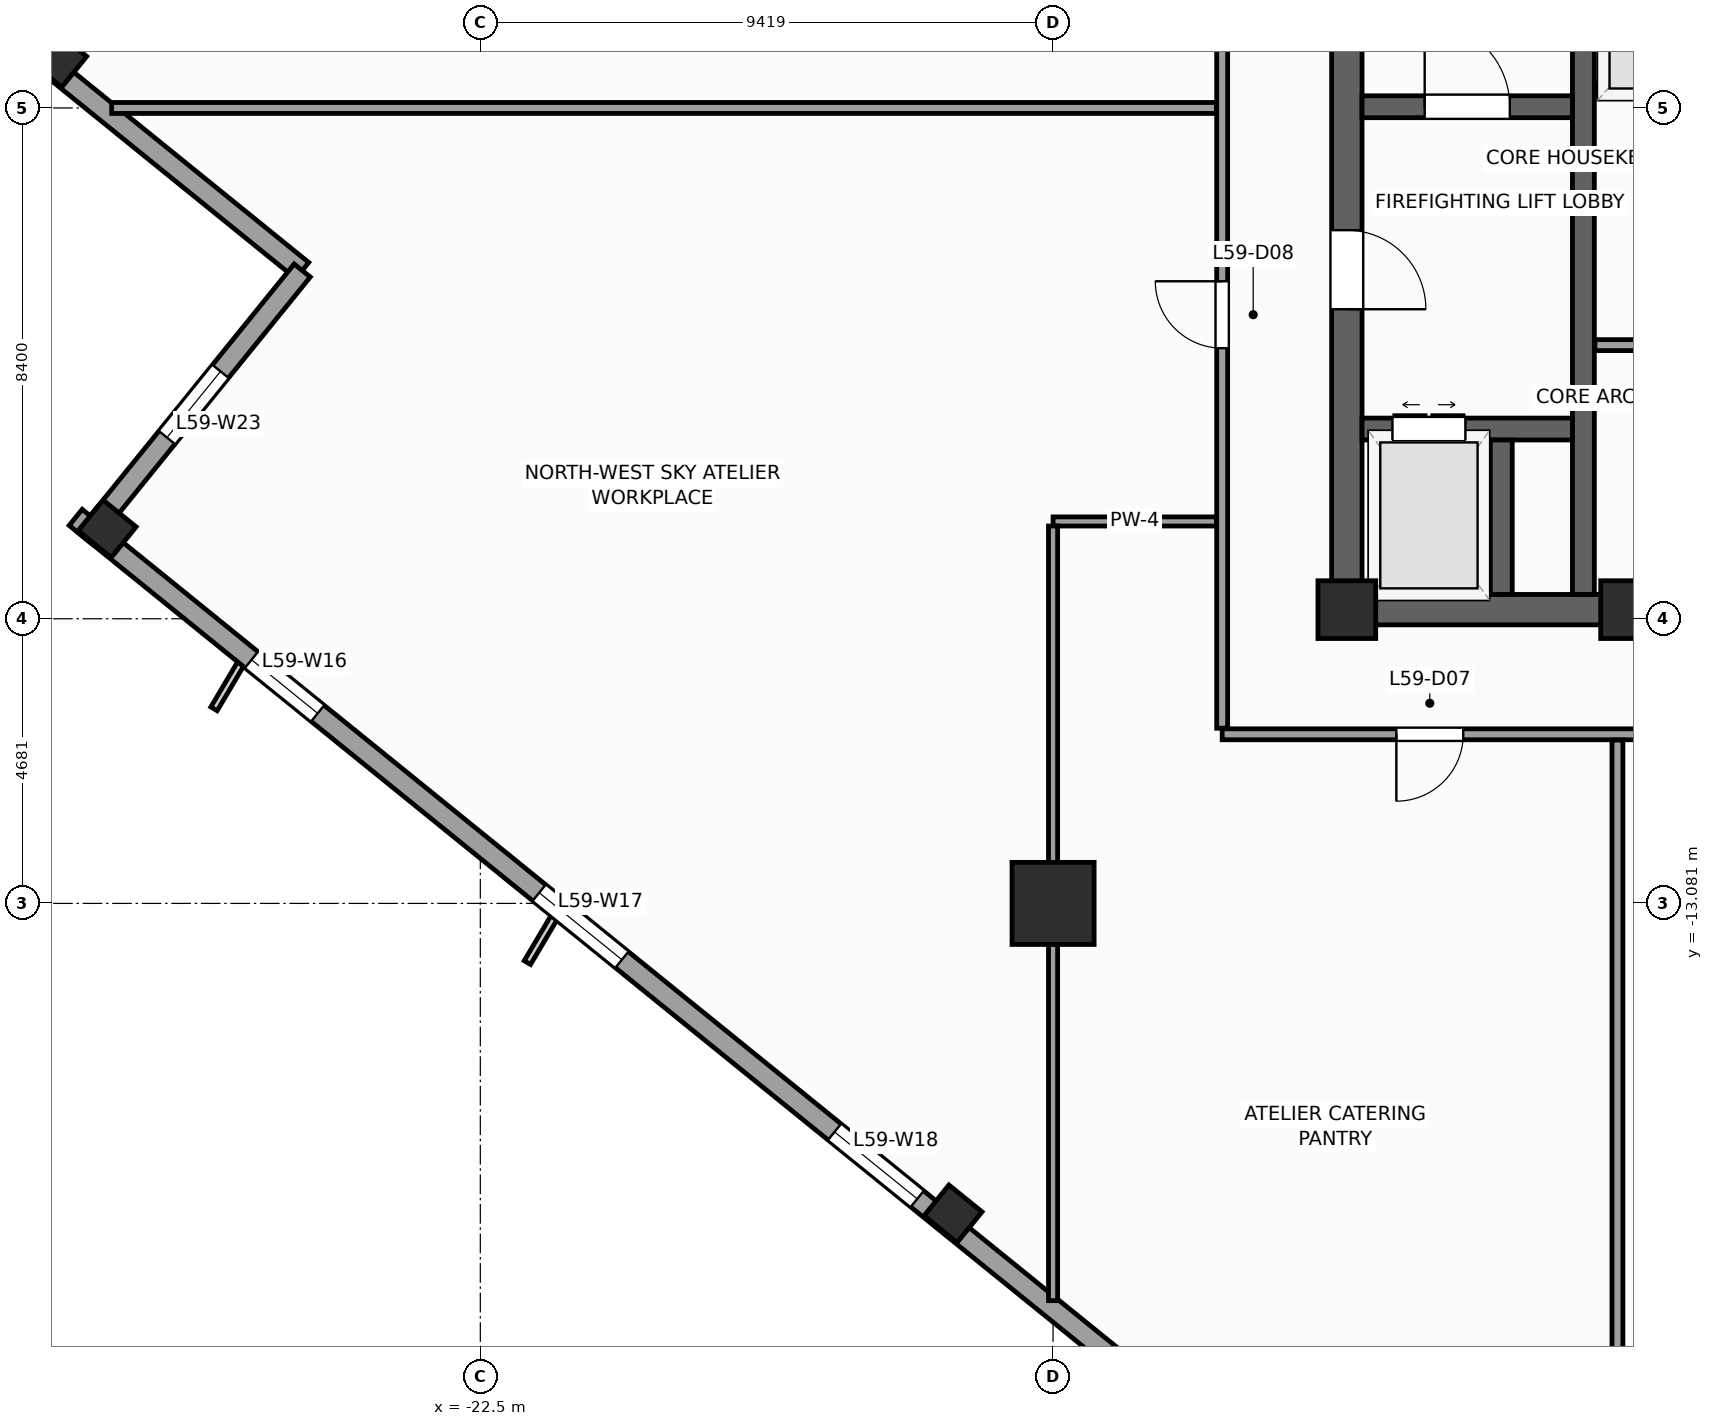
"""IFC4 building model, lengths in metres.
Left out: names, types, materials, properties, quantities, classifications, styles, units other than length and angle.
Written with IfcOpenShell. Run it as: python <this file> out.ifc"""

import sys

from ifc_helpers import new_model, si_unit, direction, frame, frame_2d, origin, origin_2d, place, context, subcontext, project, spatial, rectangle, extrude, source, transform, mapped, element, fill, save


model = new_model("IFC4")
c1 = context("Model", 3, precision=1e-05, world=origin(), true_north=direction((0.0, 1.0)))
c2 = subcontext(c1, "Body", "Model", "MODEL_VIEW")
j1 = project(units=[si_unit("LENGTHUNIT", "METRE"), si_unit("PLANEANGLEUNIT", "RADIAN")], contexts=[c1])
p1 = place(None, origin())
s1 = spatial("IfcSite", under=j1, at=p1, CompositionType="ELEMENT")
p2 = place(p1, origin())
s2 = spatial("IfcBuilding", under=s1, at=p2, CompositionType="ELEMENT")
p3 = place(p2, frame((0.0, 0.0, 244.6)))
s3 = spatial("IfcBuildingStorey", under=s2, at=p3, CompositionType="ELEMENT", Elevation=244.6)
p4 = place(p3, frame((-8.5, -8.25, 0.0), z_axis=(0.0, 0.0, 1.0), x_axis=(1.0, 0.0, 0.0)))
e1 = element("IfcWall", 1, at=p4, inside=s3, PredefinedType="SHEAR", context=c2, shape_type="SweptSolid", body=[
    extrude(rectangle(XDim=17.0, YDim=0.5, at=frame_2d((8.5, 0.0))), origin(), (0.0, 0.0, 1.0), 3.9),
])
p5 = place(p4, frame((7.85, 0.0, 0.0)))
e2 = element("IfcOpeningElement", 2, at=p5, cuts=e1, PredefinedType="OPENING", context=c2, shape_type="SweptSolid", body=[
    extrude(rectangle(XDim=1.3, YDim=2.2, at=frame_2d((0.65, 1.1))), frame((0.0, 0.26, 0.0), z_axis=(0.0, -1.0, 0.0), x_axis=(1.0, 0.0, 0.0)), (0.0, 0.0, 1.0), 0.52),
])
p6 = place(p3, frame((-8.25, -8.0, 0.0), z_axis=(0.0, 0.0, 1.0), x_axis=(0.0, 1.0, 0.0)))
e3 = element("IfcWall", 3, at=p6, inside=s3, PredefinedType="SHEAR", context=c2, shape_type="SweptSolid", body=[
    extrude(rectangle(XDim=16.0, YDim=0.5, at=frame_2d((8.0, 0.0))), origin(), (0.0, 0.0, 1.0), 3.9),
])
p7 = place(p6, frame((4.69, 0.0, 0.0)))
e4 = element("IfcOpeningElement", 4, at=p7, cuts=e3, PredefinedType="OPENING", context=c2, shape_type="SweptSolid", body=[
    extrude(rectangle(XDim=1.3, YDim=2.2, at=frame_2d((0.65, 1.1))), frame((0.0, 0.26, 0.0), z_axis=(0.0, -1.0, 0.0), x_axis=(1.0, 0.0, 0.0)), (0.0, 0.0, 1.0), 0.52),
])
p8 = place(p3, frame((-4.36, -8.0, 0.0), z_axis=(0.0, 0.0, 1.0), x_axis=(0.0, 1.0, 0.0)))
e5 = element("IfcWall", 5, at=p8, inside=s3, PredefinedType="SHEAR", context=c2, shape_type="SweptSolid", body=[
    extrude(rectangle(XDim=16.0, YDim=0.36, at=frame_2d((8.0, 0.0))), origin(), (0.0, 0.0, 1.0), 3.9),
])
p9 = place(p3, frame((-8.0, 0.02, 0.0), z_axis=(0.0, 0.0, 1.0), x_axis=(1.0, 0.0, 0.0)))
e6 = element("IfcWall", 6, at=p9, inside=s3, PredefinedType="SHEAR", context=c2, shape_type="SweptSolid", body=[
    extrude(rectangle(XDim=3.46, YDim=0.36, at=frame_2d((1.73, 0.0))), origin(), (0.0, 0.0, 1.0), 3.9),
])
p10 = place(p9, frame((1.03, 0.0, 0.0)))
e7 = element("IfcOpeningElement", 7, at=p10, cuts=e6, PredefinedType="OPENING", context=c2, shape_type="SweptSolid", body=[
    extrude(rectangle(XDim=1.4, YDim=2.2, at=frame_2d((0.7, 1.1))), frame((0.0, 0.19, 0.0), z_axis=(0.0, -1.0, 0.0), x_axis=(1.0, 0.0, 0.0)), (0.0, 0.0, 1.0), 0.38),
])
p11 = place(p3, frame((-8.0, -5.28, 0.0), z_axis=(0.0, 0.0, 1.0), x_axis=(1.0, 0.0, 0.0)))
e8 = element("IfcWall", 8, at=p11, inside=s3, PredefinedType="SHEAR", context=c2, shape_type="SweptSolid", body=[
    extrude(rectangle(XDim=3.46, YDim=0.36, at=frame_2d((1.73, 0.0))), origin(), (0.0, 0.0, 1.0), 3.9),
])
p12 = place(p11, frame((0.5, 0.0, 0.0)))
e9 = element("IfcOpeningElement", 9, at=p12, cuts=e8, PredefinedType="OPENING", context=c2, shape_type="SweptSolid", body=[
    extrude(rectangle(XDim=1.2, YDim=2.25, at=frame_2d((0.6, 1.125))), frame((0.0, 0.19, 0.0), z_axis=(0.0, -1.0, 0.0), x_axis=(1.0, 0.0, 0.0)), (0.0, 0.0, 1.0), 0.38),
])
p13 = place(p3, frame((-5.71, -8.0, 0.0), z_axis=(0.0, 0.0, 1.0), x_axis=(0.0, 1.0, 0.0)))
e10 = element("IfcWall", 10, at=p13, inside=s3, PredefinedType="SHEAR", context=c2, shape_type="SweptSolid", body=[
    extrude(rectangle(XDim=2.54, YDim=0.36, at=frame_2d((1.27, 0.0))), origin(), (0.0, 0.0, 1.0), 3.9),
])
m1 = source(origin(), c2, "Body", "SweptSolid", [
    extrude(rectangle(XDim=0.95, YDim=0.95, at=origin_2d()), origin(), (0.0, 0.0, 1.0), 3.9),
])
for number, where, z_axis, x_axis in (
    (11, (-8.25, -8.25, 0.0), (0.0, 0.0, 1.0), (1.0, 0.0, 0.0)),
    (12, (-3.6, -8.25, 0.0), (0.0, 0.0, 1.0), (1.0, 0.0, 0.0)),
):
    element("IfcColumn", number, at=place(p3, frame(where, z_axis=z_axis, x_axis=x_axis)), inside=s3, PredefinedType="PILASTER", context=c2, shape_type="MappedRepresentation", body=[
        mapped(m1, transform((0.0, 0.0, 0.0), scale=1.0)),
    ])
m2 = source(origin(), c2, "Body", "SweptSolid", [
    extrude(rectangle(XDim=1.35, YDim=1.35, at=origin_2d()), origin(), (0.0, 0.0, 1.0), 3.9),
])
p14 = place(p3, frame((-13.081, -13.081, 0.0), z_axis=(0.0, 0.0, 1.0), x_axis=(1.0, 0.0, 0.0)))
e13 = element("IfcColumn", 13, at=p14, inside=s3, PredefinedType="COLUMN", context=c2, shape_type="MappedRepresentation", body=[
    mapped(m2, transform((0.0, 0.0, 0.0), scale=1.0)),
])
m3 = source(origin(), c2, "Body", "SweptSolid", [
    extrude(rectangle(XDim=0.65, YDim=0.7, at=origin_2d()), origin(), (0.0, 0.0, 1.0), 3.9),
])
for number, where, z_axis, x_axis in (
    (14, (-29.45, 0.815, 0.0), (0.0, 0.0, 1.0), (0.629, 0.777, 0.0)),
    (15, (-28.637, -6.92, 0.0), (0.0, 0.0, 1.0), (0.629, 0.777, 0.0)),
    (16, (-14.726, -18.185, 0.0), (0.0, 0.0, 1.0), (0.629, 0.777, 0.0)),
):
    element("IfcColumn", number, at=place(p3, frame(where, z_axis=z_axis, x_axis=x_axis)), inside=s3, PredefinedType="COLUMN", context=c2, shape_type="MappedRepresentation", body=[
        mapped(m3, transform((0.0, 0.0, 0.0), scale=1.0)),
    ])
p15 = place(p3, frame((-6.733, 29.154, 0.0), z_axis=(0.0, 0.0, 1.0), x_axis=(-0.629325378072, -0.77714192302, 0.0)))
e17 = element("IfcWall", 17, at=p15, inside=s3, PredefinedType="STANDARD", context=c2, shape_type="SweptSolid", body=[
    extrude(rectangle(XDim=36.84, YDim=0.34, at=frame_2d((18.42, 0.0))), origin(), (0.0, 0.0, 1.0), 2.96),
])
p16 = place(p15, frame((23.495, 0.0, 0.0)))
e18 = element("IfcOpeningElement", 18, at=p16, cuts=e17, PredefinedType="OPENING", context=c2, shape_type="SweptSolid", body=[
    extrude(rectangle(XDim=1.05, YDim=2.25, at=frame_2d((0.525, 1.125))), frame((0.0, 0.18, 0.0), z_axis=(0.0, -1.0, 0.0), x_axis=(1.0, 0.0, 0.0)), (0.0, 0.0, 1.0), 0.36),
])
p17 = place(p15, frame((3.721, 0.0, 0.48)))
e19 = element("IfcOpeningElement", 19, at=p17, cuts=e17, PredefinedType="OPENING", context=c2, shape_type="SweptSolid", body=[
    extrude(rectangle(XDim=1.4, YDim=2.4, at=frame_2d((0.7, 1.2))), frame((0.0, 0.18, 0.0), z_axis=(0.0, -1.0, 0.0), x_axis=(1.0, 0.0, 0.0)), (0.0, 0.0, 1.0), 0.36),
])
p18 = place(p15, frame((9.809, 0.0, 0.58)))
e20 = element("IfcOpeningElement", 20, at=p18, cuts=e17, PredefinedType="OPENING", context=c2, shape_type="SweptSolid", body=[
    extrude(rectangle(XDim=1.75, YDim=2.3, at=frame_2d((0.875, 1.15))), frame((0.0, 0.18, 0.0), z_axis=(0.0, -1.0, 0.0), x_axis=(1.0, 0.0, 0.0)), (0.0, 0.0, 1.0), 0.36),
])
p19 = place(p15, frame((16.058, 0.0, 0.58)))
e21 = element("IfcOpeningElement", 21, at=p19, cuts=e17, PredefinedType="OPENING", context=c2, shape_type="SweptSolid", body=[
    extrude(rectangle(XDim=1.75, YDim=2.3, at=frame_2d((0.875, 1.15))), frame((0.0, 0.18, 0.0), z_axis=(0.0, -1.0, 0.0), x_axis=(1.0, 0.0, 0.0)), (0.0, 0.0, 1.0), 0.36),
])
p20 = place(p15, frame((25.676, 0.0, 0.58)))
e22 = element("IfcOpeningElement", 22, at=p20, cuts=e17, PredefinedType="OPENING", context=c2, shape_type="SweptSolid", body=[
    extrude(rectangle(XDim=1.75, YDim=2.3, at=frame_2d((0.875, 1.15))), frame((0.0, 0.18, 0.0), z_axis=(0.0, -1.0, 0.0), x_axis=(1.0, 0.0, 0.0)), (0.0, 0.0, 1.0), 0.36),
])
p21 = place(p15, frame((30.982, 0.0, 0.48)))
e23 = element("IfcOpeningElement", 23, at=p21, cuts=e17, PredefinedType="OPENING", context=c2, shape_type="SweptSolid", body=[
    extrude(rectangle(XDim=1.4, YDim=2.4, at=frame_2d((0.7, 1.2))), frame((0.0, 0.18, 0.0), z_axis=(0.0, -1.0, 0.0), x_axis=(1.0, 0.0, 0.0)), (0.0, 0.0, 1.0), 0.36),
])
p22 = place(p3, frame((-29.703, 0.789, 0.0), z_axis=(0.0, 0.0, 1.0), x_axis=(0.77714355312, -0.629323365087, 0.0)))
e24 = element("IfcWall", 24, at=p22, inside=s3, PredefinedType="STANDARD", context=c2, shape_type="SweptSolid", body=[
    extrude(rectangle(XDim=5.5, YDim=0.34, at=frame_2d((2.75, 0.0))), origin(), (0.0, 0.0, 1.0), 3.66),
])
p23 = place(p3, frame((-25.429, -2.673, 0.0), z_axis=(0.0, 0.0, 1.0), x_axis=(-0.629299794138, -0.777162640055, 0.0)))
e25 = element("IfcWall", 25, at=p23, inside=s3, PredefinedType="STANDARD", context=c2, shape_type="SweptSolid", body=[
    extrude(rectangle(XDim=5.67, YDim=0.34, at=frame_2d((2.835, 0.0))), origin(), (0.0, 0.0, 1.0), 3.66),
])
p24 = place(p23, frame((2.135, 0.0, 0.48)))
e26 = element("IfcOpeningElement", 26, at=p24, cuts=e25, PredefinedType="OPENING", context=c2, shape_type="SweptSolid", body=[
    extrude(rectangle(XDim=1.4, YDim=2.4, at=frame_2d((0.7, 1.2))), frame((0.0, 0.18, 0.0), z_axis=(0.0, -1.0, 0.0), x_axis=(1.0, 0.0, 0.0)), (0.0, 0.0, 1.0), 0.36),
])
p25 = place(p3, frame((-29.154, -6.733, 0.0), z_axis=(0.0, 0.0, 1.0), x_axis=(0.77714192302, -0.629325378072, 0.0)))
e27 = element("IfcWall", 27, at=p25, inside=s3, PredefinedType="STANDARD", context=c2, shape_type="SweptSolid", body=[
    extrude(rectangle(XDim=36.84, YDim=0.34, at=frame_2d((18.42, 0.0))), origin(), (0.0, 0.0, 1.0), 2.96),
])
p26 = place(p25, frame((3.721, 0.0, 0.48)))
e28 = element("IfcOpeningElement", 28, at=p26, cuts=e27, PredefinedType="OPENING", context=c2, shape_type="SweptSolid", body=[
    extrude(rectangle(XDim=1.4, YDim=2.4, at=frame_2d((0.7, 1.2))), frame((0.0, 0.18, 0.0), z_axis=(0.0, -1.0, 0.0), x_axis=(1.0, 0.0, 0.0)), (0.0, 0.0, 1.0), 0.36),
])
p27 = place(p25, frame((9.809, 0.0, 0.58)))
e29 = element("IfcOpeningElement", 29, at=p27, cuts=e27, PredefinedType="OPENING", context=c2, shape_type="SweptSolid", body=[
    extrude(rectangle(XDim=1.75, YDim=2.3, at=frame_2d((0.875, 1.15))), frame((0.0, 0.18, 0.0), z_axis=(0.0, -1.0, 0.0), x_axis=(1.0, 0.0, 0.0)), (0.0, 0.0, 1.0), 0.36),
])
p28 = place(p25, frame((16.058, 0.0, 0.58)))
e30 = element("IfcOpeningElement", 30, at=p28, cuts=e27, PredefinedType="OPENING", context=c2, shape_type="SweptSolid", body=[
    extrude(rectangle(XDim=1.75, YDim=2.3, at=frame_2d((0.875, 1.15))), frame((0.0, 0.18, 0.0), z_axis=(0.0, -1.0, 0.0), x_axis=(1.0, 0.0, 0.0)), (0.0, 0.0, 1.0), 0.36),
])
p29 = place(p25, frame((24.176, 0.0, 0.58)))
e31 = element("IfcOpeningElement", 31, at=p29, cuts=e27, PredefinedType="OPENING", context=c2, shape_type="SweptSolid", body=[
    extrude(rectangle(XDim=1.75, YDim=2.3, at=frame_2d((0.875, 1.15))), frame((0.0, 0.18, 0.0), z_axis=(0.0, -1.0, 0.0), x_axis=(1.0, 0.0, 0.0)), (0.0, 0.0, 1.0), 0.36),
])
p30 = place(p25, frame((30.232, 0.0, 0.48)))
e32 = element("IfcOpeningElement", 32, at=p30, cuts=e27, PredefinedType="OPENING", context=c2, shape_type="SweptSolid", body=[
    extrude(rectangle(XDim=1.4, YDim=2.4, at=frame_2d((0.7, 1.2))), frame((0.0, 0.18, 0.0), z_axis=(0.0, -1.0, 0.0), x_axis=(1.0, 0.0, 0.0)), (0.0, 0.0, 1.0), 0.36),
])
for number, where, z_axis, x_axis in (
    (33, (-4.17, -3.9, 0.0), (0.0, 0.0, 1.0), (1.0, 0.0, 0.0)),
    (34, (-4.17, 0.3, 0.0), (0.0, 0.0, 1.0), (1.0, 0.0, 0.0)),
):
    element("IfcWall", number, at=place(p3, frame(where, z_axis=z_axis, x_axis=x_axis)), inside=s3, PredefinedType="PARTITIONING", context=c2, shape_type="SweptSolid", body=[
        extrude(rectangle(XDim=2.28, YDim=0.18, at=frame_2d((1.14, 0.0))), origin(), (0.0, 0.0, 1.0), 3.66),
    ])
p31 = place(p3, frame((-10.3, -10.3, 0.0), z_axis=(0.0, 0.0, 1.0), x_axis=(1.0, 0.0, 0.0)))
e35 = element("IfcWall", 35, at=p31, inside=s3, PredefinedType="PARTITIONING", context=c2, shape_type="SweptSolid", body=[
    extrude(rectangle(XDim=22.75, YDim=0.18, at=frame_2d((11.375, 0.0))), origin(), (0.0, 0.0, 1.0), 3.66),
])
p32 = place(p31, frame((9.75, 0.0, 0.0)))
e36 = element("IfcOpeningElement", 36, at=p32, cuts=e35, PredefinedType="OPENING", context=c2, shape_type="SweptSolid", body=[
    extrude(rectangle(XDim=1.1, YDim=2.2, at=frame_2d((0.55, 1.1))), frame((0.0, 0.1, 0.0), z_axis=(0.0, -1.0, 0.0), x_axis=(1.0, 0.0, 0.0)), (0.0, 0.0, 1.0), 0.2),
])
p33 = place(p31, frame((2.865, 0.0, 0.0)))
e37 = element("IfcOpeningElement", 37, at=p33, cuts=e35, PredefinedType="OPENING", context=c2, shape_type="SweptSolid", body=[
    extrude(rectangle(XDim=1.1, YDim=2.2, at=frame_2d((0.55, 1.1))), frame((0.0, 0.1, 0.0), z_axis=(0.0, -1.0, 0.0), x_axis=(1.0, 0.0, 0.0)), (0.0, 0.0, 1.0), 0.2),
])
p34 = place(p3, frame((-10.3, -10.2, 0.0), z_axis=(0.0, 0.0, 1.0), x_axis=(0.0, 1.0, 0.0)))
e38 = element("IfcWall", 38, at=p34, inside=s3, PredefinedType="PARTITIONING", context=c2, shape_type="SweptSolid", body=[
    extrude(rectangle(XDim=21.5, YDim=0.18, at=frame_2d((10.75, 0.0))), origin(), (0.0, 0.0, 1.0), 3.66),
])
p35 = place(p34, frame((15.135, 0.0, 0.0)))
e39 = element("IfcOpeningElement", 39, at=p35, cuts=e38, PredefinedType="OPENING", context=c2, shape_type="SweptSolid", body=[
    extrude(rectangle(XDim=1.1, YDim=2.2, at=frame_2d((0.55, 1.1))), frame((0.0, 0.1, 0.0), z_axis=(0.0, -1.0, 0.0), x_axis=(1.0, 0.0, 0.0)), (0.0, 0.0, 1.0), 0.2),
])
p36 = place(p34, frame((6.25, 0.0, 0.0)))
e40 = element("IfcOpeningElement", 40, at=p36, cuts=e38, PredefinedType="OPENING", context=c2, shape_type="SweptSolid", body=[
    extrude(rectangle(XDim=1.1, YDim=2.2, at=frame_2d((0.55, 1.1))), frame((0.0, 0.1, 0.0), z_axis=(0.0, -1.0, 0.0), x_axis=(1.0, 0.0, 0.0)), (0.0, 0.0, 1.0), 0.2),
])
p37 = place(p3, frame((-3.8, -10.395, 0.0), z_axis=(0.0, 0.0, 1.0), x_axis=(0.0, -1.0, 0.0)))
e41 = element("IfcWall", 41, at=p37, inside=s3, PredefinedType="PARTITIONING", context=c2, shape_type="SweptSolid", body=[
    extrude(rectangle(XDim=16.734, YDim=0.18, at=frame_2d((8.367, 0.0))), origin(), (0.0, 0.0, 1.0), 3.66),
])
p38 = place(p3, frame((-10.395, 0.0, 0.0), z_axis=(0.0, 0.0, 1.0), x_axis=(-1.0, 0.0, 0.0)))
e42 = element("IfcWall", 42, at=p38, inside=s3, PredefinedType="PARTITIONING", context=c2, shape_type="SweptSolid", body=[
    extrude(rectangle(XDim=18.167, YDim=0.18, at=frame_2d((9.084, 0.0))), origin(), (0.0, 0.0, 1.0), 3.66),
])
p39 = place(p3, frame((-10.395, -6.8, 0.0), z_axis=(0.0, 0.0, 1.0), x_axis=(-1.0, 0.0, 0.0)))
e43 = element("IfcWall", 43, at=p39, inside=s3, PredefinedType="PARTITIONING", context=c2, shape_type="SweptSolid", body=[
    extrude(rectangle(XDim=2.686, YDim=0.15, at=frame_2d((1.343, 0.0))), origin(), (0.0, 0.0, 1.0), 3.66),
])
p40 = place(p3, frame((-13.081, -6.875, 0.0), z_axis=(0.0, 0.0, 1.0), x_axis=(0.0, -1.0, 0.0)))
e44 = element("IfcWall", 44, at=p40, inside=s3, PredefinedType="PARTITIONING", context=c2, shape_type="SweptSolid", body=[
    extrude(rectangle(XDim=12.739, YDim=0.15, at=frame_2d((6.37, 0.0))), origin(), (0.0, 0.0, 1.0), 2.76),
])
m4 = source(origin(), c2, "Body", "SweptSolid", [
    extrude(rectangle(XDim=1.4, YDim=2.4, at=frame_2d((0.7, 1.2))), frame((0.0, 0.03, 0.0), z_axis=(0.0, -1.0, 0.0), x_axis=(1.0, 0.0, 0.0)), (0.0, 0.0, 1.0), 0.06),
])
p41 = place(p26, origin())
e45 = element("IfcWindow", 45, at=p41, inside=s3, PartitioningType="SINGLE_PANEL", PredefinedType="WINDOW", context=c2, shape_type="MappedRepresentation", body=[
    mapped(m4, transform((0.0, 0.0, 0.0), scale=1.0)),
])
fill(e28, e45)
m5 = source(origin(), c2, "Body", "SweptSolid", [
    extrude(rectangle(XDim=1.75, YDim=2.3, at=frame_2d((0.875, 1.15))), frame((0.0, 0.03, 0.0), z_axis=(0.0, -1.0, 0.0), x_axis=(1.0, 0.0, 0.0)), (0.0, 0.0, 1.0), 0.06),
])
p42 = place(p27, origin())
e46 = element("IfcWindow", 46, at=p42, inside=s3, PartitioningType="SINGLE_PANEL", PredefinedType="WINDOW", context=c2, shape_type="MappedRepresentation", body=[
    mapped(m5, transform((0.0, 0.0, 0.0), scale=1.0)),
])
fill(e29, e46)
p43 = place(p28, origin())
e47 = element("IfcWindow", 47, at=p43, inside=s3, PartitioningType="SINGLE_PANEL", PredefinedType="WINDOW", context=c2, shape_type="MappedRepresentation", body=[
    mapped(m5, transform((0.0, 0.0, 0.0), scale=1.0)),
])
fill(e30, e47)
p44 = place(p24, origin())
e48 = element("IfcWindow", 48, at=p44, inside=s3, PartitioningType="SINGLE_PANEL", PredefinedType="WINDOW", context=c2, shape_type="MappedRepresentation", body=[
    mapped(m4, transform((0.0, 0.0, 0.0), scale=1.0)),
])
fill(e26, e48)
m6 = source(origin(), c2, "Body", "SweptSolid", [
    extrude(rectangle(XDim=1.4, YDim=2.2, at=frame_2d((0.7, 1.1))), frame((0.0, 0.025, 0.0), z_axis=(0.0, -1.0, 0.0), x_axis=(1.0, 0.0, 0.0)), (0.0, 0.0, 1.0), 0.05),
])
p45 = place(p10, origin())
e49 = element("IfcDoor", 49, at=p45, inside=s3, OperationType="SINGLE_SWING_LEFT", PredefinedType="DOOR", context=c2, shape_type="MappedRepresentation", body=[
    mapped(m6, transform((0.0, 0.0, 0.0), scale=1.0)),
])
fill(e7, e49)
m7 = source(origin(), c2, "Body", "SweptSolid", [
    extrude(rectangle(XDim=1.3, YDim=2.2, at=frame_2d((0.65, 1.1))), frame((0.0, 0.025, 0.0), z_axis=(0.0, -1.0, 0.0), x_axis=(1.0, 0.0, 0.0)), (0.0, 0.0, 1.0), 0.05),
])
p46 = place(p7, frame((1.3, 0.0, 0.0), z_axis=(0.0, 0.0, 1.0), x_axis=(-1.0, 0.0, 0.0)))
e50 = element("IfcDoor", 50, at=p46, inside=s3, OperationType="SINGLE_SWING_LEFT", PredefinedType="DOOR", context=c2, shape_type="MappedRepresentation", body=[
    mapped(m7, transform((0.0, 0.0, 0.0), scale=1.0)),
])
fill(e4, e50)
m8 = source(origin(), c2, "Body", "SweptSolid", [
    extrude(rectangle(XDim=1.2, YDim=2.25, at=frame_2d((0.6, 1.125))), frame((0.0, 0.025, 0.0), z_axis=(0.0, -1.0, 0.0), x_axis=(1.0, 0.0, 0.0)), (0.0, 0.0, 1.0), 0.05),
])
p47 = place(p12, origin())
e51 = element("IfcDoor", 51, at=p47, inside=s3, OperationType="DOUBLE_DOOR_SLIDING", PredefinedType="DOOR", context=c2, shape_type="MappedRepresentation", body=[
    mapped(m8, transform((0.0, 0.0, 0.0), scale=1.0)),
])
fill(e9, e51)
m9 = source(origin(), c2, "Body", "SweptSolid", [
    extrude(rectangle(XDim=1.1, YDim=2.2, at=frame_2d((0.55, 1.1))), frame((0.0, 0.025, 0.0), z_axis=(0.0, -1.0, 0.0), x_axis=(1.0, 0.0, 0.0)), (0.0, 0.0, 1.0), 0.05),
])
p48 = place(p33, frame((1.1, 0.0, 0.0), z_axis=(0.0, 0.0, 1.0), x_axis=(-1.0, 0.0, 0.0)))
e52 = element("IfcDoor", 52, at=p48, inside=s3, OperationType="SINGLE_SWING_LEFT", PredefinedType="DOOR", context=c2, shape_type="MappedRepresentation", body=[
    mapped(m9, transform((0.0, 0.0, 0.0), scale=1.0)),
])
fill(e37, e52)
p49 = place(p36, origin())
e53 = element("IfcDoor", 53, at=p49, inside=s3, OperationType="SINGLE_SWING_RIGHT", PredefinedType="DOOR", context=c2, shape_type="MappedRepresentation", body=[
    mapped(m9, transform((0.0, 0.0, 0.0), scale=1.0)),
])
fill(e40, e53)
save(model, sys.argv[1])
